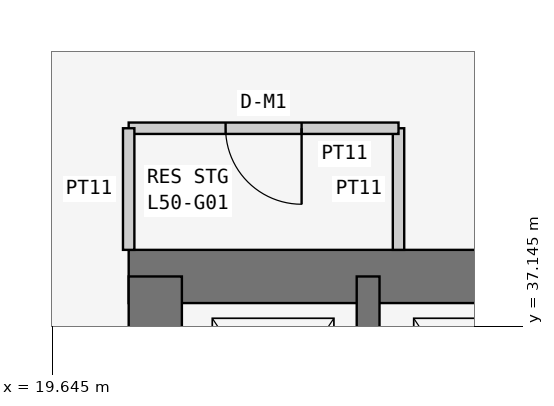
"""IFC4 building model, lengths in metres.
Left out: names, types, materials, properties, quantities, classifications, styles, units other than length and angle.
Written with IfcOpenShell. Run it as: python <this file> out.ifc"""

import sys

from ifc_helpers import new_model, si_unit, direction, frame, frame_2d, origin, place, context, subcontext, project, spatial, rectangle, extrude, element, fill, save


model = new_model("IFC4")
c1 = context("Model", 3, precision=1e-05, world=origin(), true_north=direction((0.0, 1.0)))
c2 = subcontext(c1, "Body", "Model", "MODEL_VIEW")
j1 = project(units=[si_unit("LENGTHUNIT", "METRE"), si_unit("PLANEANGLEUNIT", "RADIAN")], contexts=[c1])
p1 = place(None, origin())
s1 = spatial("IfcSite", under=j1, at=p1, CompositionType="ELEMENT")
p2 = place(p1, origin())
s2 = spatial("IfcBuilding", under=s1, at=p2, CompositionType="ELEMENT")
p3 = place(p2, frame((0.0, 0.0, 194.1)))
s3 = spatial("IfcBuildingStorey", under=s2, at=p3, CompositionType="ELEMENT", Elevation=194.1)
p4 = place(p3, frame((37.8, 37.8, 0.0), z_axis=(0.0, 0.0, 1.0), x_axis=(-1.0, 0.0, 0.0)))
e1 = element("IfcWall", 1, at=p4, inside=s3, PredefinedType="SHEAR", context=c2, shape_type="SweptSolid", body=[
    extrude(rectangle(XDim=17.15, YDim=0.7, at=frame_2d((8.575, 0.0))), origin(), (0.0, 0.0, 1.0), 3.6),
])
p5 = place(p3, frame((21.0, 37.8, 0.0), z_axis=(0.0, 0.0, 1.0), x_axis=(0.0, -1.0, 0.0)))
e2 = element("IfcWall", 2, at=p5, inside=s3, PredefinedType="SHEAR", context=c2, shape_type="SweptSolid", body=[
    extrude(rectangle(XDim=17.15, YDim=0.7, at=frame_2d((8.575, 0.0))), origin(), (0.0, 0.0, 1.0), 3.6),
])
p6 = place(p5, frame((5.4, 0.0, 0.0)))
e3 = element("IfcOpeningElement", 3, at=p6, cuts=e2, PredefinedType="OPENING", context=c2, shape_type="SweptSolid", body=[
    extrude(rectangle(XDim=1.2, YDim=2.1, at=frame_2d((0.6, 1.05))), frame((0.0, 0.36, 0.0), z_axis=(0.0, -1.0, 0.0), x_axis=(1.0, 0.0, 0.0)), (0.0, 0.0, 1.0), 0.72),
])
p7 = place(p3, frame((23.8, 34.6, 0.0), z_axis=(0.0, 0.0, 1.0), x_axis=(0.0, 1.0, 0.0)))
e4 = element("IfcWall", 4, at=p7, inside=s3, PredefinedType="SHEAR", context=c2, shape_type="SweptSolid", body=[
    extrude(rectangle(XDim=3.2, YDim=0.3, at=frame_2d((1.6, 0.0))), origin(), (0.0, 0.0, 1.0), 3.6),
])
p8 = place(p3, frame((24.2, 38.15, 0.0), z_axis=(0.0, 0.0, 1.0), x_axis=(0.0, 1.0, 0.0)))
e5 = element("IfcWall", 5, at=p8, inside=s3, PredefinedType="PARTITIONING", context=c2, shape_type="SweptSolid", body=[
    extrude(rectangle(XDim=1.6, YDim=0.15, at=frame_2d((0.8, 0.0))), origin(), (0.0, 0.0, 1.0), 3.45),
])
p9 = place(p3, frame((24.2, 39.75, 0.0), z_axis=(0.0, 0.0, 1.0), x_axis=(-1.0, 0.0, 0.0)))
e6 = element("IfcWall", 6, at=p9, inside=s3, PredefinedType="PARTITIONING", context=c2, shape_type="SweptSolid", body=[
    extrude(rectangle(XDim=3.55, YDim=0.15, at=frame_2d((1.775, 0.0))), origin(), (0.0, 0.0, 1.0), 3.45),
])
p10 = place(p9, frame((1.275, 0.0, 0.0)))
e7 = element("IfcOpeningElement", 7, at=p10, cuts=e6, PredefinedType="OPENING", context=c2, shape_type="SweptSolid", body=[
    extrude(rectangle(XDim=1.0, YDim=2.1, at=frame_2d((0.5, 1.05))), frame((0.0, 0.085, 0.0), z_axis=(0.0, -1.0, 0.0), x_axis=(1.0, 0.0, 0.0)), (0.0, 0.0, 1.0), 0.17),
])
p11 = place(p3, frame((20.65, 39.75, 0.0), z_axis=(0.0, 0.0, 1.0), x_axis=(0.0, -1.0, 0.0)))
e8 = element("IfcWall", 8, at=p11, inside=s3, PredefinedType="PARTITIONING", context=c2, shape_type="SweptSolid", body=[
    extrude(rectangle(XDim=1.6, YDim=0.15, at=frame_2d((0.8, 0.0))), origin(), (0.0, 0.0, 1.0), 3.45),
])
p12 = place(p10, origin())
e9 = element("IfcDoor", 9, at=p12, inside=s3, OperationType="SINGLE_SWING_LEFT", PredefinedType="DOOR", context=c2, shape_type="SweptSolid", body=[
    extrude(rectangle(XDim=1.0, YDim=2.1, at=frame_2d((0.5, 1.05))), frame((0.0, 0.025, 0.0), z_axis=(0.0, -1.0, 0.0), x_axis=(1.0, 0.0, 0.0)), (0.0, 0.0, 1.0), 0.05),
])
fill(e7, e9)
save(model, sys.argv[1])
